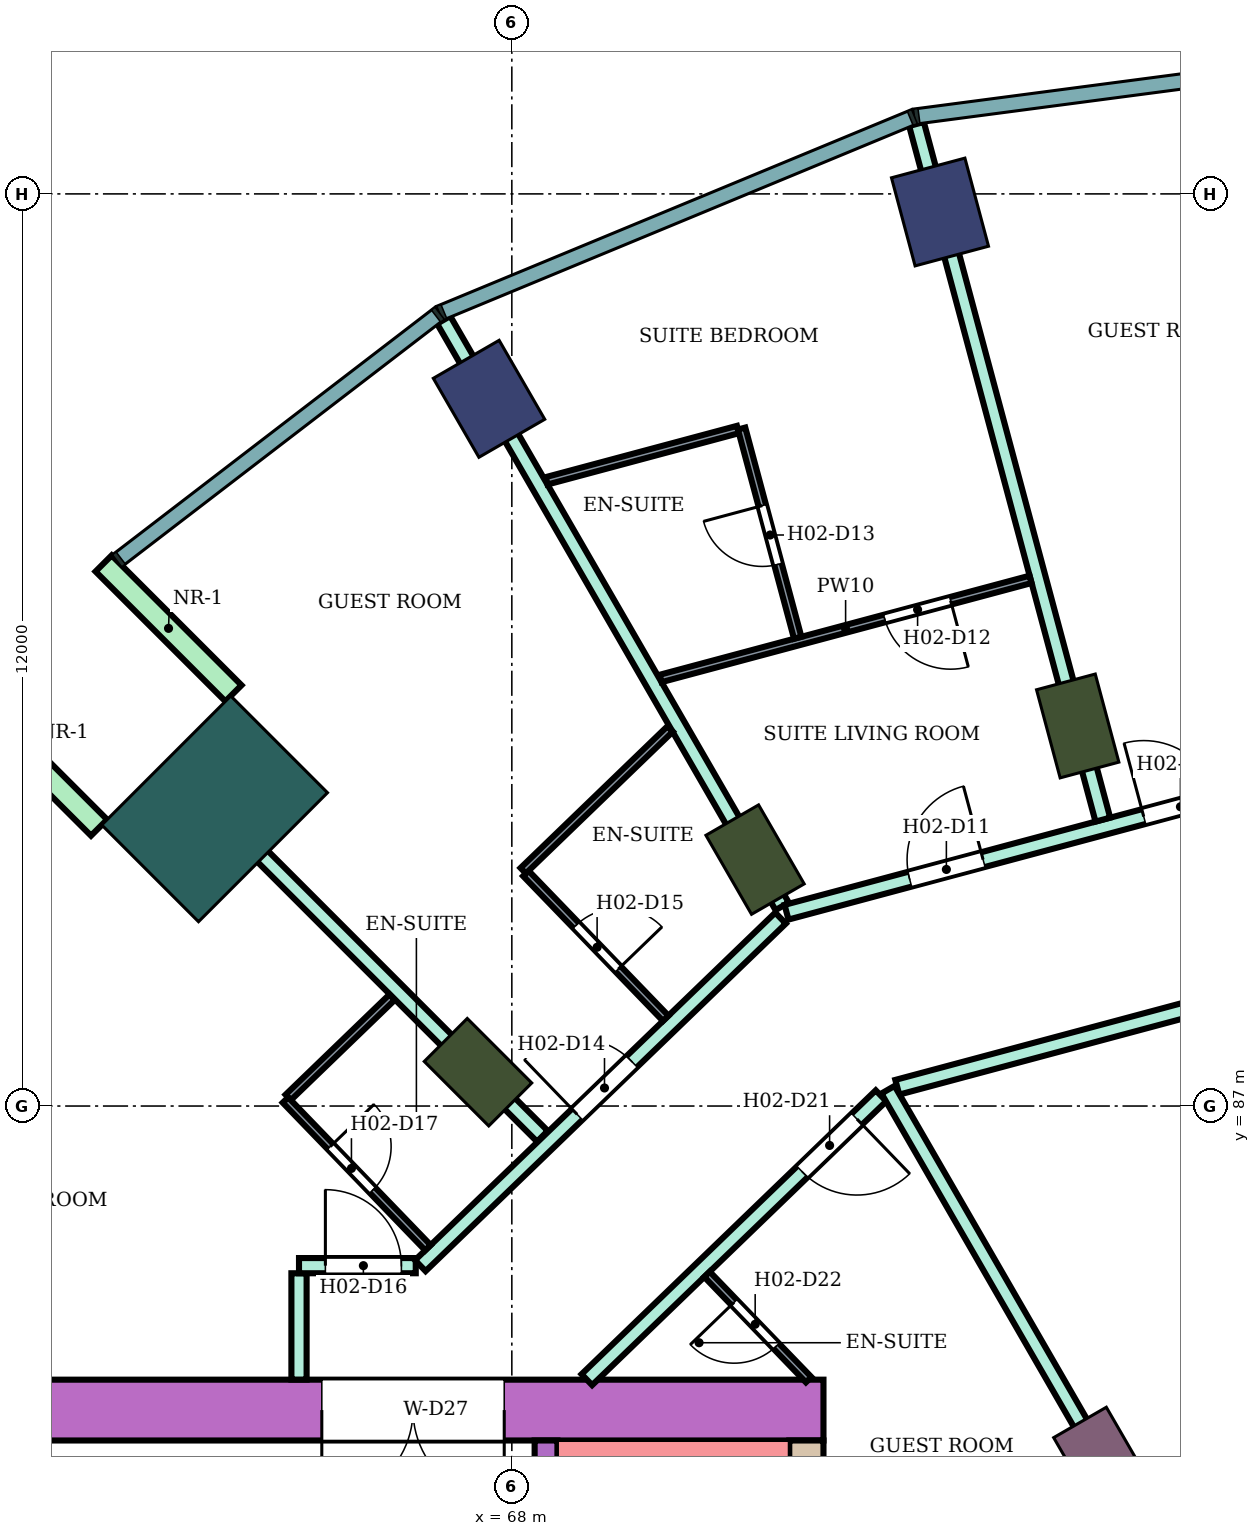
"""IFC4 building model, lengths in metres.
Left out: names, types, materials, properties, quantities, classifications, styles, units other than length and angle.
Written with IfcOpenShell. Run it as: python <this file> out.ifc"""

import sys

from ifc_helpers import new_model, si_unit, direction, frame, frame_2d, origin, origin_2d, place, context, subcontext, project, spatial, rectangle, extrude, element, fill, save


model = new_model("IFC4")
c1 = context("Model", 3, precision=1e-05, world=origin(), true_north=direction((0.0, 1.0)))
c2 = subcontext(c1, "Body", "Model", "MODEL_VIEW")
j1 = project(units=[si_unit("LENGTHUNIT", "METRE"), si_unit("PLANEANGLEUNIT", "RADIAN")], contexts=[c1])
p1 = place(None, origin())
s1 = spatial("IfcSite", under=j1, at=p1, CompositionType="ELEMENT")
p2 = place(p1, origin())
s2 = spatial("IfcBuilding", under=s1, at=p2, CompositionType="ELEMENT")
p3 = place(p2, frame((0.0, 0.0, 40.2)))
s3 = spatial("IfcBuildingStorey", under=s2, at=p3, CompositionType="ELEMENT", Elevation=40.2)
for number, where, z_axis, x_axis in (
    (1, (73.633, 98.762, 0.0), (0.0, 0.0, 1.0), (-0.259, 0.966, 0.0)),
    (2, (67.7, 96.304, 0.0), (0.0, 0.0, 1.0), (-0.5, 0.866, 0.0)),
):
    element("IfcColumn", number, at=place(p3, frame(where, z_axis=z_axis, x_axis=x_axis)), inside=s3, PredefinedType="COLUMN", context=c2, shape_type="SweptSolid", body=[
        extrude(rectangle(XDim=1.2, YDim=1.0, at=origin_2d()), origin(), (0.0, 0.0, 1.0), 3.8),
    ])
for number, where, z_axis, x_axis in (
    (3, (75.445, 92.0, 0.0), (0.0, 0.0, 1.0), (-0.259, 0.966, 0.0)),
    (4, (71.2, 90.242, 0.0), (0.0, 0.0, 1.0), (-0.5, 0.866, 0.0)),
    (5, (67.555, 87.445, 0.0), (0.0, 0.0, 1.0), (-0.707, 0.707, 0.0)),
):
    element("IfcColumn", number, at=place(p3, frame(where, z_axis=z_axis, x_axis=x_axis)), inside=s3, PredefinedType="COLUMN", context=c2, shape_type="SweptSolid", body=[
        extrude(rectangle(XDim=1.2, YDim=0.8, at=origin_2d()), origin(), (0.0, 0.0, 1.0), 3.8),
    ])
p4 = place(p3, frame((75.7, 82.448, 0.0), z_axis=(0.0, 0.0, 1.0), x_axis=(-0.5, 0.866025403784, 0.0)))
e6 = element("IfcColumn", 6, at=p4, inside=s3, PredefinedType="COLUMN", context=c2, shape_type="SweptSolid", body=[
    extrude(rectangle(XDim=0.9, YDim=0.8, at=origin_2d()), origin(), (0.0, 0.0, 1.0), 3.8),
])
p5 = place(p3, frame((64.09, 90.91, 0.0), z_axis=(0.0, 0.0, 1.0), x_axis=(-0.707106781187, 0.707106781187, 0.0)))
e7 = element("IfcColumn", 7, at=p5, inside=s3, PredefinedType="COLUMN", context=c2, shape_type="SweptSolid", body=[
    extrude(rectangle(XDim=1.8, YDim=2.4, at=origin_2d()), origin(), (0.0, 0.0, 1.0), 3.8),
])
p6 = place(p3, frame((72.1, 83.0, 0.0), z_axis=(0.0, 0.0, 1.0), x_axis=(-1.0, 0.0, 0.0)))
e8 = element("IfcWall", 8, at=p6, inside=s3, PredefinedType="SHEAR", context=c2, shape_type="SweptSolid", body=[
    extrude(rectangle(XDim=14.7, YDim=0.8, at=frame_2d((7.35, 0.0))), origin(), (0.0, 0.0, 1.0), 3.48),
])
p7 = place(p6, frame((4.2, 0.0, 0.0)))
e9 = element("IfcOpeningElement", 9, at=p7, cuts=e8, PredefinedType="OPENING", context=c2, shape_type="SweptSolid", body=[
    extrude(rectangle(XDim=2.4, YDim=2.4, at=frame_2d((1.2, 1.2))), frame((0.0, 0.41, 0.0), z_axis=(0.0, -1.0, 0.0), x_axis=(1.0, 0.0, 0.0)), (0.0, 0.0, 1.0), 0.82),
])
p8 = place(p3, frame((71.875, 82.6, 0.0), z_axis=(0.0, 0.0, 1.0), x_axis=(0.0, -1.0, 0.0)))
e10 = element("IfcWall", 10, at=p8, inside=s3, PredefinedType="SHEAR", context=c2, shape_type="SweptSolid", body=[
    extrude(rectangle(XDim=7.6, YDim=0.45, at=frame_2d((3.8, 0.0))), origin(), (0.0, 0.0, 1.0), 3.48),
])
p9 = place(p3, frame((68.45, 82.6, 0.0), z_axis=(0.0, 0.0, 1.0), x_axis=(0.0, -1.0, 0.0)))
e11 = element("IfcWall", 11, at=p9, inside=s3, PredefinedType="SHEAR", context=c2, shape_type="SweptSolid", body=[
    extrude(rectangle(XDim=7.6, YDim=0.3, at=frame_2d((3.8, 0.0))), origin(), (0.0, 0.0, 1.0), 3.48),
])
p10 = place(p9, frame((0.25, 0.0, 0.0)))
e12 = element("IfcOpeningElement", 12, at=p10, cuts=e11, PredefinedType="OPENING", context=c2, shape_type="SweptSolid", body=[
    extrude(rectangle(XDim=0.9, YDim=2.1, at=frame_2d((0.45, 1.05))), frame((0.0, 0.16, 0.0), z_axis=(0.0, -1.0, 0.0), x_axis=(1.0, 0.0, 0.0)), (0.0, 0.0, 1.0), 0.32),
])
for number, where, z_axis, x_axis in (
    (13, (64.338, 92.43, 0.0), (0.0, 0.0, 1.0), (-0.707, 0.707, 0.0)),
    (14, (62.57, 90.662, 0.0), (0.0, 0.0, 1.0), (-0.707, 0.707, 0.0)),
):
    element("IfcWall", number, at=place(p3, frame(where, z_axis=z_axis, x_axis=x_axis)), inside=s3, PredefinedType="NOTDEFINED", context=c2, shape_type="SweptSolid", body=[
        extrude(rectangle(XDim=2.416, YDim=0.3, at=frame_2d((1.208, 0.0))), origin(), (0.0, 0.0, 1.0), 3.8),
    ])
p11 = place(p3, frame((80.0, 82.604, 0.0), z_axis=(0.0, 0.0, 1.0), x_axis=(-0.965933654434, -0.258789828301, 0.0)))
e15 = element("IfcWall", 15, at=p11, inside=s3, PredefinedType="NOTDEFINED", context=c2, shape_type="SweptSolid", body=[
    extrude(rectangle(XDim=3.936, YDim=0.2, at=frame_2d((1.968, 0.0))), origin(), (0.0, 0.0, 1.0), 3.8),
])
p12 = place(p11, frame((0.468, 0.0, 0.9)))
e16 = element("IfcOpeningElement", 16, at=p12, cuts=e15, PredefinedType="OPENING", context=c2, shape_type="SweptSolid", body=[
    extrude(rectangle(XDim=3.0, YDim=2.3, at=frame_2d((1.5, 1.15))), frame((0.0, 0.11, 0.0), z_axis=(0.0, -1.0, 0.0), x_axis=(1.0, 0.0, 0.0)), (0.0, 0.0, 1.0), 0.22),
])
p13 = place(p3, frame((63.599, 91.408, 0.0), z_axis=(0.0, 0.0, 1.0), x_axis=(0.706981017422, -0.707232522587, 0.0)))
e17 = element("IfcWall", 17, at=p13, inside=s3, PredefinedType="PARTITIONING", context=c2, shape_type="SweptSolid", body=[
    extrude(rectangle(XDim=6.795, YDim=0.2, at=frame_2d((3.397, 0.0))), origin(), (0.0, 0.0, 1.0), 3.35),
])
p14 = place(p3, frame((65.2, 83.401, 0.0), z_axis=(0.0, 0.0, 1.0), x_axis=(0.0, 1.0, 0.0)))
e18 = element("IfcWall", 18, at=p14, inside=s3, PredefinedType="PARTITIONING", context=c2, shape_type="SweptSolid", body=[
    extrude(rectangle(XDim=1.399, YDim=0.2, at=frame_2d((0.7, 0.0))), origin(), (0.0, 0.0, 1.0), 3.35),
])
p15 = place(p3, frame((65.2, 84.9, 0.0), z_axis=(0.0, 0.0, 1.0), x_axis=(1.0, 0.0, 0.0)))
e19 = element("IfcWall", 19, at=p15, inside=s3, PredefinedType="PARTITIONING", context=c2, shape_type="SweptSolid", body=[
    extrude(rectangle(XDim=1.536, YDim=0.2, at=frame_2d((0.768, 0.0))), origin(), (0.0, 0.0, 1.0), 3.35),
])
p16 = place(p15, frame((0.347, 0.0, 0.0)))
e20 = element("IfcOpeningElement", 20, at=p16, cuts=e19, PredefinedType="OPENING", context=c2, shape_type="SweptSolid", body=[
    extrude(rectangle(XDim=1.0, YDim=2.1, at=frame_2d((0.5, 1.05))), frame((0.0, 0.11, 0.0), z_axis=(0.0, -1.0, 0.0), x_axis=(1.0, 0.0, 0.0)), (0.0, 0.0, 1.0), 0.22),
])
p17 = place(p3, frame((66.796, 84.9, 0.0), z_axis=(0.0, 0.0, 1.0), x_axis=(0.719690131178, 0.694295409092, 0.0)))
e21 = element("IfcWall", 21, at=p17, inside=s3, PredefinedType="PARTITIONING", context=c2, shape_type="SweptSolid", body=[
    extrude(rectangle(XDim=6.585, YDim=0.2, at=frame_2d((3.293, 0.0))), origin(), (0.0, 0.0, 1.0), 3.35),
])
p18 = place(p17, frame((2.867, 0.0, 0.0)))
e22 = element("IfcOpeningElement", 22, at=p18, cuts=e21, PredefinedType="OPENING", context=c2, shape_type="SweptSolid", body=[
    extrude(rectangle(XDim=1.0, YDim=2.1, at=frame_2d((0.5, 1.05))), frame((0.0, 0.11, 0.0), z_axis=(0.0, -1.0, 0.0), x_axis=(1.0, 0.0, 0.0)), (0.0, 0.0, 1.0), 0.22),
])
p19 = place(p3, frame((67.103, 97.343, 0.0), z_axis=(0.0, 0.0, 1.0), x_axis=(0.499900389553, -0.866082906265, 0.0)))
e23 = element("IfcWall", 23, at=p19, inside=s3, PredefinedType="PARTITIONING", context=c2, shape_type="SweptSolid", body=[
    extrude(rectangle(XDim=8.908, YDim=0.2, at=frame_2d((4.454, 0.0))), origin(), (0.0, 0.0, 1.0), 3.35),
])
p20 = place(p3, frame((68.987, 83.4, 0.0), z_axis=(0.0, 0.0, 1.0), x_axis=(0.719591503389, 0.694397629784, 0.0)))
e24 = element("IfcWall", 24, at=p20, inside=s3, PredefinedType="PARTITIONING", context=c2, shape_type="SweptSolid", body=[
    extrude(rectangle(XDim=5.378, YDim=0.2, at=frame_2d((2.689, 0.0))), origin(), (0.0, 0.0, 1.0), 3.35),
])
p21 = place(p20, frame((3.938, 0.0, 0.0)))
e25 = element("IfcOpeningElement", 25, at=p21, cuts=e24, PredefinedType="OPENING", context=c2, shape_type="SweptSolid", body=[
    extrude(rectangle(XDim=1.0, YDim=2.1, at=frame_2d((0.5, 1.05))), frame((0.0, 0.11, 0.0), z_axis=(0.0, -1.0, 0.0), x_axis=(1.0, 0.0, 0.0)), (0.0, 0.0, 1.0), 0.22),
])
p22 = place(p3, frame((71.614, 89.55, 0.0), z_axis=(0.0, 0.0, 1.0), x_axis=(0.96597505802, 0.258635239832, 0.0)))
e26 = element("IfcWall", 26, at=p22, inside=s3, PredefinedType="PARTITIONING", context=c2, shape_type="SweptSolid", body=[
    extrude(rectangle(XDim=8.592, YDim=0.2, at=frame_2d((4.296, 0.0))), origin(), (0.0, 0.0, 1.0), 3.35),
])
p23 = place(p22, frame((4.865, 0.0, 0.0)))
e27 = element("IfcOpeningElement", 27, at=p23, cuts=e26, PredefinedType="OPENING", context=c2, shape_type="SweptSolid", body=[
    extrude(rectangle(XDim=1.0, YDim=2.1, at=frame_2d((0.5, 1.05))), frame((0.0, 0.11, 0.0), z_axis=(0.0, -1.0, 0.0), x_axis=(1.0, 0.0, 0.0)), (0.0, 0.0, 1.0), 0.22),
])
p24 = place(p22, frame((1.677, 0.0, 0.0)))
e28 = element("IfcOpeningElement", 28, at=p24, cuts=e26, PredefinedType="OPENING", context=c2, shape_type="SweptSolid", body=[
    extrude(rectangle(XDim=1.0, YDim=2.1, at=frame_2d((0.5, 1.05))), frame((0.0, 0.11, 0.0), z_axis=(0.0, -1.0, 0.0), x_axis=(1.0, 0.0, 0.0)), (0.0, 0.0, 1.0), 0.22),
])
p25 = place(p3, frame((73.071, 87.247, 0.0), z_axis=(0.0, 0.0, 1.0), x_axis=(0.965920206274, 0.258840018373, 0.0)))
e29 = element("IfcWall", 29, at=p25, inside=s3, PredefinedType="PARTITIONING", context=c2, shape_type="SweptSolid", body=[
    extrude(rectangle(XDim=7.123, YDim=0.2, at=frame_2d((3.562, 0.0))), origin(), (0.0, 0.0, 1.0), 3.35),
])
p26 = place(p3, frame((72.949, 87.215, 0.0), z_axis=(0.0, 0.0, 1.0), x_axis=(0.499890755261, -0.866088467077, 0.0)))
e30 = element("IfcWall", 30, at=p26, inside=s3, PredefinedType="PARTITIONING", context=c2, shape_type="SweptSolid", body=[
    extrude(rectangle(XDim=6.404, YDim=0.2, at=frame_2d((3.202, 0.0))), origin(), (0.0, 0.0, 1.0), 3.35),
])
p27 = place(p3, frame((73.323, 99.919, 0.0), z_axis=(0.0, 0.0, 1.0), x_axis=(0.258786746607, -0.965934480066, 0.0)))
e31 = element("IfcWall", 31, at=p27, inside=s3, PredefinedType="PARTITIONING", context=c2, shape_type="SweptSolid", body=[
    extrude(rectangle(XDim=9.475, YDim=0.2, at=frame_2d((4.737, 0.0))), origin(), (0.0, 0.0, 1.0), 3.35),
])
p28 = place(p3, frame((65.058, 87.114, 0.0), z_axis=(0.0, 0.0, 1.0), x_axis=(0.719715847356, 0.694268751324, 0.0)))
e32 = element("IfcWall", 32, at=p28, inside=s3, PredefinedType="PARTITIONING", context=c2, shape_type="SweptSolid", body=[
    extrude(rectangle(XDim=1.9, YDim=0.1, at=frame_2d((0.95, 0.0))), origin(), (0.0, 0.0, 1.0), 3.35),
])
p29 = place(p3, frame((65.022, 87.079, 0.0), z_axis=(0.0, 0.0, 1.0), x_axis=(0.694287838235, -0.719697434815, 0.0)))
e33 = element("IfcWall", 33, at=p29, inside=s3, PredefinedType="PARTITIONING", context=c2, shape_type="SweptSolid", body=[
    extrude(rectangle(XDim=2.7, YDim=0.1, at=frame_2d((1.35, 0.0))), origin(), (0.0, 0.0, 1.0), 3.35),
])
p30 = place(p29, frame((0.85, 0.0, 0.0)))
e34 = element("IfcOpeningElement", 34, at=p30, cuts=e33, PredefinedType="OPENING", context=c2, shape_type="SweptSolid", body=[
    extrude(rectangle(XDim=0.8, YDim=2.1, at=frame_2d((0.4, 1.05))), frame((0.0, 0.06, 0.0), z_axis=(0.0, -1.0, 0.0), x_axis=(1.0, 0.0, 0.0)), (0.0, 0.0, 1.0), 0.12),
])
p31 = place(p3, frame((68.185, 90.06, 0.0), z_axis=(0.0, 0.0, 1.0), x_axis=(0.69446127412, -0.719530081892, 0.0)))
e35 = element("IfcWall", 35, at=p31, inside=s3, PredefinedType="PARTITIONING", context=c2, shape_type="SweptSolid", body=[
    extrude(rectangle(XDim=2.649, YDim=0.1, at=frame_2d((1.324, 0.0))), origin(), (0.0, 0.0, 1.0), 3.35),
])
p32 = place(p31, frame((0.95, 0.0, 0.0)))
e36 = element("IfcOpeningElement", 36, at=p32, cuts=e35, PredefinedType="OPENING", context=c2, shape_type="SweptSolid", body=[
    extrude(rectangle(XDim=0.8, YDim=2.1, at=frame_2d((0.4, 1.05))), frame((0.0, 0.06, 0.0), z_axis=(0.0, -1.0, 0.0), x_axis=(1.0, 0.0, 0.0)), (0.0, 0.0, 1.0), 0.12),
])
p33 = place(p3, frame((68.15, 90.096, 0.0), z_axis=(0.0, 0.0, 1.0), x_axis=(0.719623741095, 0.69436422089, 0.0)))
e37 = element("IfcWall", 37, at=p33, inside=s3, PredefinedType="PARTITIONING", context=c2, shape_type="SweptSolid", body=[
    extrude(rectangle(XDim=2.687, YDim=0.1, at=frame_2d((1.344, 0.0))), origin(), (0.0, 0.0, 1.0), 3.35),
])
p34 = place(p3, frame((68.457, 95.225, 0.0), z_axis=(0.0, 0.0, 1.0), x_axis=(0.965887416682, 0.258962349183, 0.0)))
e38 = element("IfcWall", 38, at=p34, inside=s3, PredefinedType="PARTITIONING", context=c2, shape_type="SweptSolid", body=[
    extrude(rectangle(XDim=2.607, YDim=0.1, at=frame_2d((1.303, 0.0))), origin(), (0.0, 0.0, 1.0), 3.35),
])
p35 = place(p3, frame((69.958, 92.625, 0.0), z_axis=(0.0, 0.0, 1.0), x_axis=(0.96595043048, 0.258727203548, 0.0)))
e39 = element("IfcWall", 39, at=p35, inside=s3, PredefinedType="PARTITIONING", context=c2, shape_type="SweptSolid", body=[
    extrude(rectangle(XDim=5.038, YDim=0.1, at=frame_2d((2.519, 0.0))), origin(), (0.0, 0.0, 1.0), 3.35),
])
p36 = place(p35, frame((3.049, 0.0, 0.0)))
e40 = element("IfcOpeningElement", 40, at=p36, cuts=e39, PredefinedType="OPENING", context=c2, shape_type="SweptSolid", body=[
    extrude(rectangle(XDim=0.9, YDim=2.1, at=frame_2d((0.45, 1.05))), frame((0.0, 0.06, 0.0), z_axis=(0.0, -1.0, 0.0), x_axis=(1.0, 0.0, 0.0)), (0.0, 0.0, 1.0), 0.12),
])
p37 = place(p3, frame((70.567, 84.786, 0.0), z_axis=(0.0, 0.0, 1.0), x_axis=(0.694447472534, -0.719543402368, 0.0)))
e41 = element("IfcWall", 41, at=p37, inside=s3, PredefinedType="PARTITIONING", context=c2, shape_type="SweptSolid", body=[
    extrude(rectangle(XDim=1.926, YDim=0.1, at=frame_2d((0.963, 0.0))), origin(), (0.0, 0.0, 1.0), 3.35),
])
p38 = place(p37, frame((0.513, 0.0, 0.0)))
e42 = element("IfcOpeningElement", 42, at=p38, cuts=e41, PredefinedType="OPENING", context=c2, shape_type="SweptSolid", body=[
    extrude(rectangle(XDim=0.8, YDim=2.1, at=frame_2d((0.4, 1.05))), frame((0.0, 0.06, 0.0), z_axis=(0.0, -1.0, 0.0), x_axis=(1.0, 0.0, 0.0)), (0.0, 0.0, 1.0), 0.12),
])
p39 = place(p3, frame((71.023, 95.913, 0.0), z_axis=(0.0, 0.0, 1.0), x_axis=(0.258968734817, -0.965885704619, 0.0)))
e43 = element("IfcWall", 43, at=p39, inside=s3, PredefinedType="PARTITIONING", context=c2, shape_type="SweptSolid", body=[
    extrude(rectangle(XDim=2.85, YDim=0.1, at=frame_2d((1.425, 0.0))), origin(), (0.0, 0.0, 1.0), 3.35),
])
p40 = place(p39, frame((1.05, 0.0, 0.0)))
e44 = element("IfcOpeningElement", 44, at=p40, cuts=e43, PredefinedType="OPENING", context=c2, shape_type="SweptSolid", body=[
    extrude(rectangle(XDim=0.8, YDim=2.1, at=frame_2d((0.4, 1.05))), frame((0.0, 0.06, 0.0), z_axis=(0.0, -1.0, 0.0), x_axis=(1.0, 0.0, 0.0)), (0.0, 0.0, 1.0), 0.12),
])
p41 = place(p12, origin())
e45 = element("IfcWindow", 45, at=p41, inside=s3, PartitioningType="SINGLE_PANEL", PredefinedType="WINDOW", context=c2, shape_type="SweptSolid", body=[
    extrude(rectangle(XDim=3.0, YDim=2.3, at=frame_2d((1.5, 1.15))), frame((0.0, 0.03, 0.0), z_axis=(0.0, -1.0, 0.0), x_axis=(1.0, 0.0, 0.0)), (0.0, 0.0, 1.0), 0.06),
])
fill(e16, e45)
p42 = place(p23, origin())
e46 = element("IfcDoor", 46, at=p42, inside=s3, OperationType="SINGLE_SWING_LEFT", PredefinedType="DOOR", context=c2, shape_type="SweptSolid", body=[
    extrude(rectangle(XDim=1.0, YDim=2.1, at=frame_2d((0.5, 1.05))), frame((0.0, 0.025, 0.0), z_axis=(0.0, -1.0, 0.0), x_axis=(1.0, 0.0, 0.0)), (0.0, 0.0, 1.0), 0.05),
])
fill(e27, e46)
p43 = place(p24, origin())
e47 = element("IfcDoor", 47, at=p43, inside=s3, OperationType="SINGLE_SWING_RIGHT", PredefinedType="DOOR", context=c2, shape_type="SweptSolid", body=[
    extrude(rectangle(XDim=1.0, YDim=2.1, at=frame_2d((0.5, 1.05))), frame((0.0, 0.025, 0.0), z_axis=(0.0, -1.0, 0.0), x_axis=(1.0, 0.0, 0.0)), (0.0, 0.0, 1.0), 0.05),
])
fill(e28, e47)
p44 = place(p36, frame((0.9, 0.0, 0.0), z_axis=(0.0, 0.0, 1.0), x_axis=(-1.0, 0.0, 0.0)))
e48 = element("IfcDoor", 48, at=p44, inside=s3, OperationType="SINGLE_SWING_LEFT", PredefinedType="DOOR", context=c2, shape_type="SweptSolid", body=[
    extrude(rectangle(XDim=0.9, YDim=2.1, at=frame_2d((0.45, 1.05))), frame((0.0, 0.025, 0.0), z_axis=(0.0, -1.0, 0.0), x_axis=(1.0, 0.0, 0.0)), (0.0, 0.0, 1.0), 0.05),
])
fill(e40, e48)
p45 = place(p40, frame((0.8, 0.0, 0.0), z_axis=(0.0, 0.0, 1.0), x_axis=(-1.0, 0.0, 0.0)))
e49 = element("IfcDoor", 49, at=p45, inside=s3, OperationType="SINGLE_SWING_RIGHT", PredefinedType="DOOR", context=c2, shape_type="SweptSolid", body=[
    extrude(rectangle(XDim=0.8, YDim=2.1, at=frame_2d((0.4, 1.05))), frame((0.0, 0.025, 0.0), z_axis=(0.0, -1.0, 0.0), x_axis=(1.0, 0.0, 0.0)), (0.0, 0.0, 1.0), 0.05),
])
fill(e44, e49)
p46 = place(p18, origin())
e50 = element("IfcDoor", 50, at=p46, inside=s3, OperationType="SINGLE_SWING_LEFT", PredefinedType="DOOR", context=c2, shape_type="SweptSolid", body=[
    extrude(rectangle(XDim=1.0, YDim=2.1, at=frame_2d((0.5, 1.05))), frame((0.0, 0.025, 0.0), z_axis=(0.0, -1.0, 0.0), x_axis=(1.0, 0.0, 0.0)), (0.0, 0.0, 1.0), 0.05),
])
fill(e22, e50)
p47 = place(p32, origin())
e51 = element("IfcDoor", 51, at=p47, inside=s3, OperationType="SINGLE_SWING_RIGHT", PredefinedType="DOOR", context=c2, shape_type="SweptSolid", body=[
    extrude(rectangle(XDim=0.8, YDim=2.1, at=frame_2d((0.4, 1.05))), frame((0.0, 0.025, 0.0), z_axis=(0.0, -1.0, 0.0), x_axis=(1.0, 0.0, 0.0)), (0.0, 0.0, 1.0), 0.05),
])
fill(e36, e51)
p48 = place(p16, origin())
e52 = element("IfcDoor", 52, at=p48, inside=s3, OperationType="SINGLE_SWING_LEFT", PredefinedType="DOOR", context=c2, shape_type="SweptSolid", body=[
    extrude(rectangle(XDim=1.0, YDim=2.1, at=frame_2d((0.5, 1.05))), frame((0.0, 0.025, 0.0), z_axis=(0.0, -1.0, 0.0), x_axis=(1.0, 0.0, 0.0)), (0.0, 0.0, 1.0), 0.05),
])
fill(e20, e52)
p49 = place(p30, origin())
e53 = element("IfcDoor", 53, at=p49, inside=s3, OperationType="SINGLE_SWING_LEFT", PredefinedType="DOOR", context=c2, shape_type="SweptSolid", body=[
    extrude(rectangle(XDim=0.8, YDim=2.1, at=frame_2d((0.4, 1.05))), frame((0.0, 0.025, 0.0), z_axis=(0.0, -1.0, 0.0), x_axis=(1.0, 0.0, 0.0)), (0.0, 0.0, 1.0), 0.05),
])
fill(e34, e53)
p50 = place(p21, frame((1.0, 0.0, 0.0), z_axis=(0.0, 0.0, 1.0), x_axis=(-1.0, 0.0, 0.0)))
e54 = element("IfcDoor", 54, at=p50, inside=s3, OperationType="SINGLE_SWING_LEFT", PredefinedType="DOOR", context=c2, shape_type="SweptSolid", body=[
    extrude(rectangle(XDim=1.0, YDim=2.1, at=frame_2d((0.5, 1.05))), frame((0.0, 0.025, 0.0), z_axis=(0.0, -1.0, 0.0), x_axis=(1.0, 0.0, 0.0)), (0.0, 0.0, 1.0), 0.05),
])
fill(e25, e54)
p51 = place(p38, frame((0.8, 0.0, 0.0), z_axis=(0.0, 0.0, 1.0), x_axis=(-1.0, 0.0, 0.0)))
e55 = element("IfcDoor", 55, at=p51, inside=s3, OperationType="SINGLE_SWING_RIGHT", PredefinedType="DOOR", context=c2, shape_type="SweptSolid", body=[
    extrude(rectangle(XDim=0.8, YDim=2.1, at=frame_2d((0.4, 1.05))), frame((0.0, 0.025, 0.0), z_axis=(0.0, -1.0, 0.0), x_axis=(1.0, 0.0, 0.0)), (0.0, 0.0, 1.0), 0.05),
])
fill(e42, e55)
p52 = place(p7, origin())
e56 = element("IfcDoor", 56, at=p52, inside=s3, OperationType="DOUBLE_DOOR_SINGLE_SWING", PredefinedType="DOOR", context=c2, shape_type="SweptSolid", body=[
    extrude(rectangle(XDim=2.4, YDim=2.4, at=frame_2d((1.2, 1.2))), frame((0.0, 0.025, 0.0), z_axis=(0.0, -1.0, 0.0), x_axis=(1.0, 0.0, 0.0)), (0.0, 0.0, 1.0), 0.05),
])
fill(e9, e56)
save(model, sys.argv[1])
